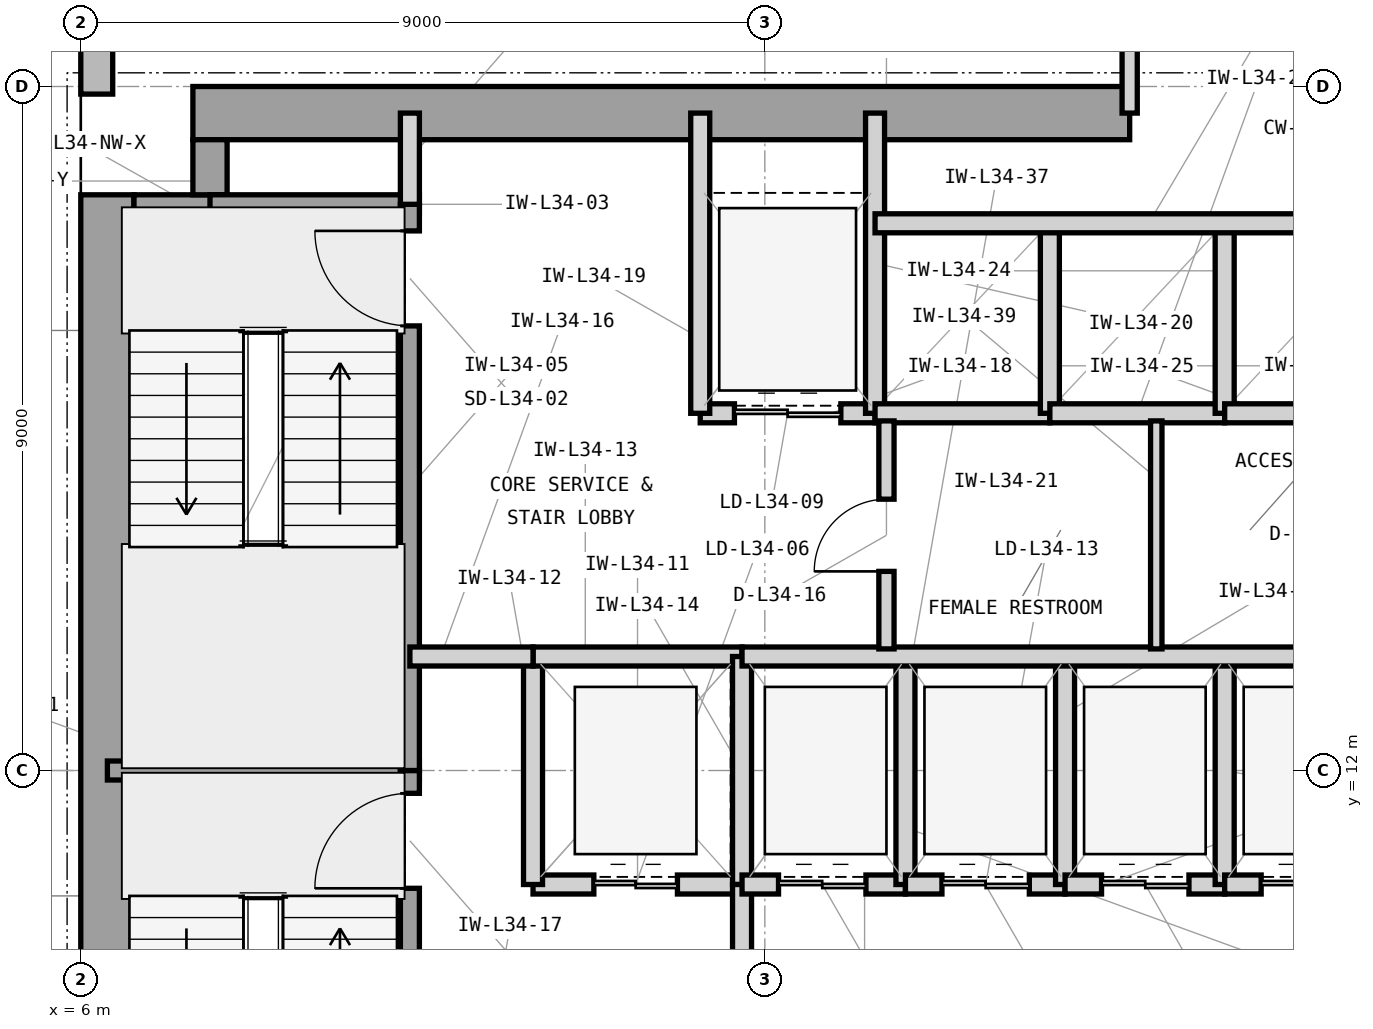
"""IFC4 building model, lengths in metres.
Left out: names, types, materials, properties, quantities, classifications, styles, units other than length and angle.
Written with IfcOpenShell. Run it as: python <this file> out.ifc"""

import sys

from ifc_helpers import new_model, si_unit, direction, frame, frame_2d, origin, place, context, subcontext, project, spatial, rectangle, extrude, element, fill, save


model = new_model("IFC4")
c1 = context("Model", 3, precision=1e-05, world=origin(), true_north=direction((0.0, 1.0)))
c2 = subcontext(c1, "Body", "Model", "MODEL_VIEW")
j1 = project(units=[si_unit("LENGTHUNIT", "METRE"), si_unit("PLANEANGLEUNIT", "RADIAN")], contexts=[c1])
p1 = place(None, origin())
s1 = spatial("IfcSite", under=j1, at=p1, CompositionType="ELEMENT")
p2 = place(p1, origin())
s2 = spatial("IfcBuilding", under=s1, at=p2, CompositionType="ELEMENT")
p3 = place(p2, frame((0.0, 0.0, 144.0)))
s3 = spatial("IfcBuildingStorey", under=s2, at=p3, CompositionType="ELEMENT", Elevation=144.0)
p4 = place(p3, frame((6.35, 4.425, 0.0), z_axis=(0.0, 0.0, 1.0), x_axis=(0.0, 1.0, 0.0)))
e1 = element("IfcWall", 1, at=p4, inside=s3, PredefinedType="SHEAR", context=c2, shape_type="SweptSolid", body=[
    extrude(rectangle(XDim=15.15, YDim=0.7, at=frame_2d((7.575, 0.0))), origin(), (0.0, 0.0, 1.0), 3.9),
])
p5 = place(p3, frame((7.475, 20.65, 0.0), z_axis=(0.0, 0.0, 1.0), x_axis=(1.0, 0.0, 0.0)))
e2 = element("IfcWall", 2, at=p5, inside=s3, PredefinedType="SHEAR", context=c2, shape_type="SweptSolid", body=[
    extrude(rectangle(XDim=12.325, YDim=0.7, at=frame_2d((6.163, 0.0))), origin(), (0.0, 0.0, 1.0), 3.9),
])
p6 = place(p3, frame((6.7, 19.35, 0.0), z_axis=(0.0, 0.0, 1.0), x_axis=(1.0, 0.0, 0.0)))
e3 = element("IfcWall", 3, at=p6, inside=s3, PredefinedType="SHEAR", context=c2, shape_type="SweptSolid", body=[
    extrude(rectangle(XDim=1.225, YDim=0.45, at=frame_2d((0.613, 0.0))), origin(), (0.0, 0.0, 1.0), 3.9),
])
p7 = place(p3, frame((7.7, 19.575, 0.0), z_axis=(0.0, 0.0, 1.0), x_axis=(0.0, 1.0, 0.0)))
e4 = element("IfcWall", 4, at=p7, inside=s3, PredefinedType="SHEAR", context=c2, shape_type="SweptSolid", body=[
    extrude(rectangle(XDim=0.725, YDim=0.45, at=frame_2d((0.363, 0.0))), origin(), (0.0, 0.0, 1.0), 3.9),
])
p8 = place(p3, frame((6.21, 46.4, 0.0), z_axis=(0.0, 0.0, 1.0), x_axis=(0.0, -1.0, 0.0)))
e5 = element("IfcWall", 5, at=p8, inside=s3, PredefinedType="STANDARD", context=c2, shape_type="SweptSolid", body=[
    extrude(rectangle(XDim=25.5, YDim=0.42, at=frame_2d((12.75, 0.0))), origin(), (0.0, 0.0, 1.0), 3.7),
])
p9 = place(p8, frame((11.5, 0.0, 0.85)))
e6 = element("IfcOpeningElement", 6, at=p9, cuts=e5, PredefinedType="OPENING", context=c2, shape_type="SweptSolid", body=[
    extrude(rectangle(XDim=2.5, YDim=2.25, at=frame_2d((1.25, 1.125))), frame((0.0, 0.22, 0.0), z_axis=(0.0, -1.0, 0.0), x_axis=(1.0, 0.0, 0.0)), (0.0, 0.0, 1.0), 0.44),
])
p10 = place(p3, frame((6.35, 12.0, 0.0), z_axis=(0.0, 0.0, 1.0), x_axis=(1.0, 0.0, 0.0)))
e7 = element("IfcWall", 7, at=p10, inside=s3, PredefinedType="SHEAR", context=c2, shape_type="SweptSolid", body=[
    extrude(rectangle(XDim=4.105, YDim=0.25, at=frame_2d((2.052, 0.0))), origin(), (0.0, 0.0, 1.0), 3.9),
])
p11 = place(p3, frame((7.7, 19.45, 0.0), z_axis=(0.0, 0.0, 1.0), x_axis=(1.0, 0.0, 0.0)))
e8 = element("IfcWall", 8, at=p11, inside=s3, PredefinedType="SHEAR", context=c2, shape_type="SweptSolid", body=[
    extrude(rectangle(XDim=2.755, YDim=0.25, at=frame_2d((1.377, 0.0))), origin(), (0.0, 0.0, 1.0), 3.9),
])
p12 = place(p3, frame((10.33, 4.55, 0.0), z_axis=(0.0, 0.0, 1.0), x_axis=(0.0, 1.0, 0.0)))
e9 = element("IfcWall", 9, at=p12, inside=s3, PredefinedType="SHEAR", context=c2, shape_type="SweptSolid", body=[
    extrude(rectangle(XDim=7.45, YDim=0.25, at=frame_2d((3.725, 0.0))), origin(), (0.0, 0.0, 1.0), 3.9),
])
p13 = place(p12, frame((5.9, 0.0, 0.0)))
e10 = element("IfcOpeningElement", 10, at=p13, cuts=e9, PredefinedType="OPENING", context=c2, shape_type="SweptSolid", body=[
    extrude(rectangle(XDim=1.25, YDim=2.2, at=frame_2d((0.625, 1.1))), frame((0.0, 0.135, 0.0), z_axis=(0.0, -1.0, 0.0), x_axis=(1.0, 0.0, 0.0)), (0.0, 0.0, 1.0), 0.27),
])
p14 = place(p3, frame((10.33, 12.0, 0.0), z_axis=(0.0, 0.0, 1.0), x_axis=(0.0, 1.0, 0.0)))
e11 = element("IfcWall", 11, at=p14, inside=s3, PredefinedType="SHEAR", context=c2, shape_type="SweptSolid", body=[
    extrude(rectangle(XDim=7.45, YDim=0.25, at=frame_2d((3.725, 0.0))), origin(), (0.0, 0.0, 1.0), 3.9),
])
p15 = place(p14, frame((5.85, 0.0, 0.0)))
e12 = element("IfcOpeningElement", 12, at=p15, cuts=e11, PredefinedType="OPENING", context=c2, shape_type="SweptSolid", body=[
    extrude(rectangle(XDim=1.25, YDim=2.2, at=frame_2d((0.625, 1.1))), frame((0.0, 0.135, 0.0), z_axis=(0.0, -1.0, 0.0), x_axis=(1.0, 0.0, 0.0)), (0.0, 0.0, 1.0), 0.27),
])
p16 = place(p3, frame((10.33, 19.45, 0.0), z_axis=(0.0, 0.0, 1.0), x_axis=(0.0, 1.0, 0.0)))
e13 = element("IfcWall", 13, at=p16, inside=s3, PredefinedType="PARTITIONING", context=c2, shape_type="SweptSolid", body=[
    extrude(rectangle(XDim=1.2, YDim=0.25, at=frame_2d((0.6, 0.0))), origin(), (0.0, 0.0, 1.0), 2.994),
])
p17 = place(p3, frame((11.95, 10.5, 0.0), z_axis=(0.0, 0.0, 1.0), x_axis=(1.0, 0.0, 0.0)))
e14 = element("IfcWall", 14, at=p17, inside=s3, PredefinedType="PARTITIONING", context=c2, shape_type="SweptSolid", body=[
    extrude(rectangle(XDim=2.75, YDim=0.25, at=frame_2d((1.375, 0.0))), origin(), (0.0, 0.0, 1.0), 3.233),
])
p18 = place(p17, frame((0.8, 0.0, 0.0)))
e15 = element("IfcOpeningElement", 15, at=p18, cuts=e14, PredefinedType="OPENING", context=c2, shape_type="SweptSolid", body=[
    extrude(rectangle(XDim=1.1, YDim=2.25, at=frame_2d((0.55, 1.125))), frame((0.0, 0.135, 0.0), z_axis=(0.0, -1.0, 0.0), x_axis=(1.0, 0.0, 0.0)), (0.0, 0.0, 1.0), 0.27),
])
p19 = place(p3, frame((11.95, 10.5, 0.0), z_axis=(0.0, 0.0, 1.0), x_axis=(0.0, 1.0, 0.0)))
e16 = element("IfcWall", 16, at=p19, inside=s3, PredefinedType="PARTITIONING", context=c2, shape_type="SweptSolid", body=[
    extrude(rectangle(XDim=3.0, YDim=0.25, at=frame_2d((1.5, 0.0))), origin(), (0.0, 0.0, 1.0), 3.69),
])
p20 = place(p3, frame((11.95, 13.5, 0.0), z_axis=(0.0, 0.0, 1.0), x_axis=(1.0, 0.0, 0.0)))
e17 = element("IfcWall", 17, at=p20, inside=s3, PredefinedType="PARTITIONING", context=c2, shape_type="SweptSolid", body=[
    extrude(rectangle(XDim=2.75, YDim=0.25, at=frame_2d((1.375, 0.0))), origin(), (0.0, 0.0, 1.0), 3.233),
])
p21 = place(p3, frame((14.7, 10.5, 0.0), z_axis=(0.0, 0.0, 1.0), x_axis=(0.0, 1.0, 0.0)))
e18 = element("IfcWall", 18, at=p21, inside=s3, PredefinedType="PARTITIONING", context=c2, shape_type="SweptSolid", body=[
    extrude(rectangle(XDim=3.0, YDim=0.25, at=frame_2d((1.5, 0.0))), origin(), (0.0, 0.0, 1.0), 3.69),
])
p22 = place(p3, frame((14.7, 6.7, 0.0), z_axis=(0.0, 0.0, 1.0), x_axis=(0.0, 1.0, 0.0)))
e19 = element("IfcWall", 19, at=p22, inside=s3, PredefinedType="PARTITIONING", context=c2, shape_type="SweptSolid", body=[
    extrude(rectangle(XDim=3.8, YDim=0.25, at=frame_2d((1.9, 0.0))), origin(), (0.0, 0.0, 1.0), 3.69),
])
p23 = place(p22, frame((1.3, 0.0, 0.0)))
e20 = element("IfcOpeningElement", 20, at=p23, cuts=e19, PredefinedType="OPENING", context=c2, shape_type="SweptSolid", body=[
    extrude(rectangle(XDim=1.2, YDim=2.2, at=frame_2d((0.6, 1.1))), frame((0.0, 0.135, 0.0), z_axis=(0.0, -1.0, 0.0), x_axis=(1.0, 0.0, 0.0)), (0.0, 0.0, 1.0), 0.27),
])
p24 = place(p3, frame((10.33, 13.5, 0.0), z_axis=(0.0, 0.0, 1.0), x_axis=(1.0, 0.0, 0.0)))
e21 = element("IfcWall", 21, at=p24, inside=s3, PredefinedType="PARTITIONING", context=c2, shape_type="SweptSolid", body=[
    extrude(rectangle(XDim=1.62, YDim=0.25, at=frame_2d((0.81, 0.0))), origin(), (0.0, 0.0, 1.0), 3.233),
])
p25 = place(p3, frame((14.15, 16.7, 0.0), z_axis=(0.0, 0.0, 1.0), x_axis=(1.0, 0.0, 0.0)))
e22 = element("IfcWall", 22, at=p25, inside=s3, PredefinedType="PARTITIONING", context=c2, shape_type="SweptSolid", body=[
    extrude(rectangle(XDim=2.3, YDim=0.25, at=frame_2d((1.15, 0.0))), origin(), (0.0, 0.0, 1.0), 3.233),
])
p26 = place(p25, frame((0.45, 0.0, 0.0)))
e23 = element("IfcOpeningElement", 23, at=p26, cuts=e22, PredefinedType="OPENING", context=c2, shape_type="SweptSolid", body=[
    extrude(rectangle(XDim=1.4, YDim=2.35, at=frame_2d((0.7, 1.175))), frame((0.0, 0.135, 0.0), z_axis=(0.0, -1.0, 0.0), x_axis=(1.0, 0.0, 0.0)), (0.0, 0.0, 1.0), 0.27),
])
for number, where, z_axis, x_axis in (
    (24, (14.15, 16.7, 0.0), (0.0, 0.0, 1.0), (0.0, 1.0, 0.0)),
    (25, (16.45, 16.7, 0.0), (0.0, 0.0, 1.0), (0.0, 1.0, 0.0)),
):
    element("IfcWall", number, at=place(p3, frame(where, z_axis=z_axis, x_axis=x_axis)), inside=s3, PredefinedType="PARTITIONING", context=c2, shape_type="SweptSolid", body=[
        extrude(rectangle(XDim=3.95, YDim=0.25, at=frame_2d((1.975, 0.0))), origin(), (0.0, 0.0, 1.0), 3.69),
    ])
p27 = place(p3, frame((16.45, 16.7, 0.0), z_axis=(0.0, 0.0, 1.0), x_axis=(1.0, 0.0, 0.0)))
e26 = element("IfcWall", 26, at=p27, inside=s3, PredefinedType="PARTITIONING", context=c2, shape_type="SweptSolid", body=[
    extrude(rectangle(XDim=2.3, YDim=0.25, at=frame_2d((1.15, 0.0))), origin(), (0.0, 0.0, 1.0), 3.233),
])
p28 = place(p3, frame((18.75, 16.7, 0.0), z_axis=(0.0, 0.0, 1.0), x_axis=(0.0, 1.0, 0.0)))
e27 = element("IfcWall", 27, at=p28, inside=s3, PredefinedType="PARTITIONING", context=c2, shape_type="SweptSolid", body=[
    extrude(rectangle(XDim=2.5, YDim=0.25, at=frame_2d((1.25, 0.0))), origin(), (0.0, 0.0, 1.0), 3.69),
])
p29 = place(p3, frame((18.75, 16.7, 0.0), z_axis=(0.0, 0.0, 1.0), x_axis=(1.0, 0.0, 0.0)))
e28 = element("IfcWall", 28, at=p29, inside=s3, PredefinedType="PARTITIONING", context=c2, shape_type="SweptSolid", body=[
    extrude(rectangle(XDim=2.3, YDim=0.25, at=frame_2d((1.15, 0.0))), origin(), (0.0, 0.0, 1.0), 3.233),
])
p30 = place(p3, frame((21.05, 16.7, 0.0), z_axis=(0.0, 0.0, 1.0), x_axis=(0.0, 1.0, 0.0)))
e29 = element("IfcWall", 29, at=p30, inside=s3, PredefinedType="PARTITIONING", context=c2, shape_type="SweptSolid", body=[
    extrude(rectangle(XDim=2.5, YDim=0.25, at=frame_2d((1.25, 0.0))), origin(), (0.0, 0.0, 1.0), 3.69),
])
p31 = place(p3, frame((21.05, 16.7, 0.0), z_axis=(0.0, 0.0, 1.0), x_axis=(1.0, 0.0, 0.0)))
e30 = element("IfcWall", 30, at=p31, inside=s3, PredefinedType="PARTITIONING", context=c2, shape_type="SweptSolid", body=[
    extrude(rectangle(XDim=2.4, YDim=0.25, at=frame_2d((1.2, 0.0))), origin(), (0.0, 0.0, 1.0), 3.233),
])
p32 = place(p3, frame((16.45, 19.2, 0.0), z_axis=(0.0, 0.0, 1.0), x_axis=(1.0, 0.0, 0.0)))
e31 = element("IfcWall", 31, at=p32, inside=s3, PredefinedType="PARTITIONING", context=c2, shape_type="SweptSolid", body=[
    extrude(rectangle(XDim=7.2, YDim=0.25, at=frame_2d((3.6, 0.0))), origin(), (0.0, 0.0, 1.0), 3.69),
])
p33 = place(p3, frame((14.7, 10.5, 0.0), z_axis=(0.0, 0.0, 1.0), x_axis=(1.0, 0.0, 0.0)))
e32 = element("IfcWall", 32, at=p33, inside=s3, PredefinedType="PARTITIONING", context=c2, shape_type="SweptSolid", body=[
    extrude(rectangle(XDim=2.15, YDim=0.25, at=frame_2d((1.075, 0.0))), origin(), (0.0, 0.0, 1.0), 3.233),
])
p34 = place(p33, frame((0.48, 0.0, 0.0)))
e33 = element("IfcOpeningElement", 33, at=p34, cuts=e32, PredefinedType="OPENING", context=c2, shape_type="SweptSolid", body=[
    extrude(rectangle(XDim=1.15, YDim=2.25, at=frame_2d((0.575, 1.125))), frame((0.0, 0.135, 0.0), z_axis=(0.0, -1.0, 0.0), x_axis=(1.0, 0.0, 0.0)), (0.0, 0.0, 1.0), 0.27),
])
p35 = place(p3, frame((16.85, 10.5, 0.0), z_axis=(0.0, 0.0, 1.0), x_axis=(0.0, 1.0, 0.0)))
e34 = element("IfcWall", 34, at=p35, inside=s3, PredefinedType="PARTITIONING", context=c2, shape_type="SweptSolid", body=[
    extrude(rectangle(XDim=3.0, YDim=0.25, at=frame_2d((1.5, 0.0))), origin(), (0.0, 0.0, 1.0), 3.69),
])
p36 = place(p3, frame((16.85, 10.5, 0.0), z_axis=(0.0, 0.0, 1.0), x_axis=(1.0, 0.0, 0.0)))
e35 = element("IfcWall", 35, at=p36, inside=s3, PredefinedType="PARTITIONING", context=c2, shape_type="SweptSolid", body=[
    extrude(rectangle(XDim=2.1, YDim=0.25, at=frame_2d((1.05, 0.0))), origin(), (0.0, 0.0, 1.0), 3.233),
])
p37 = place(p36, frame((0.48, 0.0, 0.0)))
e36 = element("IfcOpeningElement", 36, at=p37, cuts=e35, PredefinedType="OPENING", context=c2, shape_type="SweptSolid", body=[
    extrude(rectangle(XDim=1.15, YDim=2.25, at=frame_2d((0.575, 1.125))), frame((0.0, 0.135, 0.0), z_axis=(0.0, -1.0, 0.0), x_axis=(1.0, 0.0, 0.0)), (0.0, 0.0, 1.0), 0.27),
])
p38 = place(p3, frame((18.95, 10.5, 0.0), z_axis=(0.0, 0.0, 1.0), x_axis=(0.0, 1.0, 0.0)))
e37 = element("IfcWall", 37, at=p38, inside=s3, PredefinedType="PARTITIONING", context=c2, shape_type="SweptSolid", body=[
    extrude(rectangle(XDim=3.0, YDim=0.25, at=frame_2d((1.5, 0.0))), origin(), (0.0, 0.0, 1.0), 3.69),
])
p39 = place(p3, frame((18.95, 10.5, 0.0), z_axis=(0.0, 0.0, 1.0), x_axis=(1.0, 0.0, 0.0)))
e38 = element("IfcWall", 38, at=p39, inside=s3, PredefinedType="PARTITIONING", context=c2, shape_type="SweptSolid", body=[
    extrude(rectangle(XDim=2.1, YDim=0.25, at=frame_2d((1.05, 0.0))), origin(), (0.0, 0.0, 1.0), 3.233),
])
p40 = place(p39, frame((0.48, 0.0, 0.0)))
e39 = element("IfcOpeningElement", 39, at=p40, cuts=e38, PredefinedType="OPENING", context=c2, shape_type="SweptSolid", body=[
    extrude(rectangle(XDim=1.15, YDim=2.25, at=frame_2d((0.575, 1.125))), frame((0.0, 0.135, 0.0), z_axis=(0.0, -1.0, 0.0), x_axis=(1.0, 0.0, 0.0)), (0.0, 0.0, 1.0), 0.27),
])
p41 = place(p3, frame((21.05, 10.5, 0.0), z_axis=(0.0, 0.0, 1.0), x_axis=(0.0, 1.0, 0.0)))
e40 = element("IfcWall", 40, at=p41, inside=s3, PredefinedType="PARTITIONING", context=c2, shape_type="SweptSolid", body=[
    extrude(rectangle(XDim=3.0, YDim=0.25, at=frame_2d((1.5, 0.0))), origin(), (0.0, 0.0, 1.0), 3.69),
])
p42 = place(p3, frame((21.05, 10.5, 0.0), z_axis=(0.0, 0.0, 1.0), x_axis=(1.0, 0.0, 0.0)))
e41 = element("IfcWall", 41, at=p42, inside=s3, PredefinedType="PARTITIONING", context=c2, shape_type="SweptSolid", body=[
    extrude(rectangle(XDim=2.4, YDim=0.25, at=frame_2d((1.2, 0.0))), origin(), (0.0, 0.0, 1.0), 3.233),
])
p43 = place(p42, frame((0.48, 0.0, 0.0)))
e42 = element("IfcOpeningElement", 42, at=p43, cuts=e41, PredefinedType="OPENING", context=c2, shape_type="SweptSolid", body=[
    extrude(rectangle(XDim=1.15, YDim=2.25, at=frame_2d((0.575, 1.125))), frame((0.0, 0.135, 0.0), z_axis=(0.0, -1.0, 0.0), x_axis=(1.0, 0.0, 0.0)), (0.0, 0.0, 1.0), 0.27),
])
p44 = place(p3, frame((14.7, 13.5, 0.0), z_axis=(0.0, 0.0, 1.0), x_axis=(1.0, 0.0, 0.0)))
e43 = element("IfcWall", 43, at=p44, inside=s3, PredefinedType="PARTITIONING", context=c2, shape_type="SweptSolid", body=[
    extrude(rectangle(XDim=8.95, YDim=0.25, at=frame_2d((4.475, 0.0))), origin(), (0.0, 0.0, 1.0), 3.233),
])
p45 = place(p3, frame((16.6, 13.6, 0.0), z_axis=(0.0, 0.0, 1.0), x_axis=(0.0, 1.0, 0.0)))
e44 = element("IfcWall", 44, at=p45, inside=s3, PredefinedType="PARTITIONING", context=c2, shape_type="SweptSolid", body=[
    extrude(rectangle(XDim=3.0, YDim=0.2, at=frame_2d((1.5, 0.0))), origin(), (0.0, 0.0, 1.0), 3.69),
])
p46 = place(p45, frame((1.02, 0.0, 0.0)))
e45 = element("IfcOpeningElement", 45, at=p46, cuts=e44, PredefinedType="OPENING", context=c2, shape_type="SweptSolid", body=[
    extrude(rectangle(XDim=0.95, YDim=2.1, at=frame_2d((0.475, 1.05))), frame((0.0, 0.11, 0.0), z_axis=(0.0, -1.0, 0.0), x_axis=(1.0, 0.0, 0.0)), (0.0, 0.0, 1.0), 0.22),
])
p47 = place(p3, frame((20.15, 13.6, 0.0), z_axis=(0.0, 0.0, 1.0), x_axis=(0.0, 1.0, 0.0)))
e46 = element("IfcWall", 46, at=p47, inside=s3, PredefinedType="PARTITIONING", context=c2, shape_type="SweptSolid", body=[
    extrude(rectangle(XDim=3.0, YDim=0.15, at=frame_2d((1.5, 0.0))), origin(), (0.0, 0.0, 1.0), 3.69),
])
p48 = place(p3, frame((19.8, 20.65, 0.0), z_axis=(0.0, 0.0, 1.0), x_axis=(0.0, 1.0, 0.0)))
e47 = element("IfcWall", 47, at=p48, inside=s3, PredefinedType="PARTITIONING", context=c2, shape_type="SweptSolid", body=[
    extrude(rectangle(XDim=6.15, YDim=0.2, at=frame_2d((3.075, 0.0))), origin(), (0.0, 0.0, 1.0), 3.69),
])
p49 = place(p13, origin())
e48 = element("IfcDoor", 48, at=p49, inside=s3, OperationType="SINGLE_SWING_LEFT", PredefinedType="DOOR", context=c2, shape_type="SweptSolid", body=[
    extrude(rectangle(XDim=1.25, YDim=2.2, at=frame_2d((0.625, 1.1))), frame((0.0, 0.025, 0.0), z_axis=(0.0, -1.0, 0.0), x_axis=(1.0, 0.0, 0.0)), (0.0, 0.0, 1.0), 0.05),
])
fill(e10, e48)
p50 = place(p15, origin())
e49 = element("IfcDoor", 49, at=p50, inside=s3, OperationType="SINGLE_SWING_RIGHT", PredefinedType="DOOR", context=c2, shape_type="SweptSolid", body=[
    extrude(rectangle(XDim=1.25, YDim=2.2, at=frame_2d((0.625, 1.1))), frame((0.0, 0.025, 0.0), z_axis=(0.0, -1.0, 0.0), x_axis=(1.0, 0.0, 0.0)), (0.0, 0.0, 1.0), 0.05),
])
fill(e12, e49)
p51 = place(p18, origin())
e50 = element("IfcDoor", 50, at=p51, inside=s3, OperationType="DOUBLE_DOOR_SLIDING", PredefinedType="DOOR", context=c2, shape_type="SweptSolid", body=[
    extrude(rectangle(XDim=1.1, YDim=2.25, at=frame_2d((0.55, 1.125))), frame((0.0, 0.025, 0.0), z_axis=(0.0, -1.0, 0.0), x_axis=(1.0, 0.0, 0.0)), (0.0, 0.0, 1.0), 0.05),
])
fill(e15, e50)
p52 = place(p26, origin())
e51 = element("IfcDoor", 51, at=p52, inside=s3, OperationType="DOUBLE_DOOR_SLIDING", PredefinedType="DOOR", context=c2, shape_type="SweptSolid", body=[
    extrude(rectangle(XDim=1.4, YDim=2.35, at=frame_2d((0.7, 1.175))), frame((0.0, 0.025, 0.0), z_axis=(0.0, -1.0, 0.0), x_axis=(1.0, 0.0, 0.0)), (0.0, 0.0, 1.0), 0.05),
])
fill(e23, e51)
p53 = place(p34, origin())
e52 = element("IfcDoor", 52, at=p53, inside=s3, OperationType="DOUBLE_DOOR_SLIDING", PredefinedType="DOOR", context=c2, shape_type="SweptSolid", body=[
    extrude(rectangle(XDim=1.15, YDim=2.25, at=frame_2d((0.575, 1.125))), frame((0.0, 0.025, 0.0), z_axis=(0.0, -1.0, 0.0), x_axis=(1.0, 0.0, 0.0)), (0.0, 0.0, 1.0), 0.05),
])
fill(e33, e52)
p54 = place(p37, origin())
e53 = element("IfcDoor", 53, at=p54, inside=s3, OperationType="DOUBLE_DOOR_SLIDING", PredefinedType="DOOR", context=c2, shape_type="SweptSolid", body=[
    extrude(rectangle(XDim=1.15, YDim=2.25, at=frame_2d((0.575, 1.125))), frame((0.0, 0.025, 0.0), z_axis=(0.0, -1.0, 0.0), x_axis=(1.0, 0.0, 0.0)), (0.0, 0.0, 1.0), 0.05),
])
fill(e36, e53)
p55 = place(p40, origin())
e54 = element("IfcDoor", 54, at=p55, inside=s3, OperationType="DOUBLE_DOOR_SLIDING", PredefinedType="DOOR", context=c2, shape_type="SweptSolid", body=[
    extrude(rectangle(XDim=1.15, YDim=2.25, at=frame_2d((0.575, 1.125))), frame((0.0, 0.025, 0.0), z_axis=(0.0, -1.0, 0.0), x_axis=(1.0, 0.0, 0.0)), (0.0, 0.0, 1.0), 0.05),
])
fill(e39, e54)
p56 = place(p43, origin())
e55 = element("IfcDoor", 55, at=p56, inside=s3, OperationType="DOUBLE_DOOR_SLIDING", PredefinedType="DOOR", context=c2, shape_type="SweptSolid", body=[
    extrude(rectangle(XDim=1.15, YDim=2.25, at=frame_2d((0.575, 1.125))), frame((0.0, 0.025, 0.0), z_axis=(0.0, -1.0, 0.0), x_axis=(1.0, 0.0, 0.0)), (0.0, 0.0, 1.0), 0.05),
])
fill(e42, e55)
p57 = place(p46, origin())
e56 = element("IfcDoor", 56, at=p57, inside=s3, OperationType="SINGLE_SWING_LEFT", PredefinedType="DOOR", context=c2, shape_type="SweptSolid", body=[
    extrude(rectangle(XDim=0.95, YDim=2.1, at=frame_2d((0.475, 1.05))), frame((0.0, 0.025, 0.0), z_axis=(0.0, -1.0, 0.0), x_axis=(1.0, 0.0, 0.0)), (0.0, 0.0, 1.0), 0.05),
])
fill(e45, e56)
save(model, sys.argv[1])
